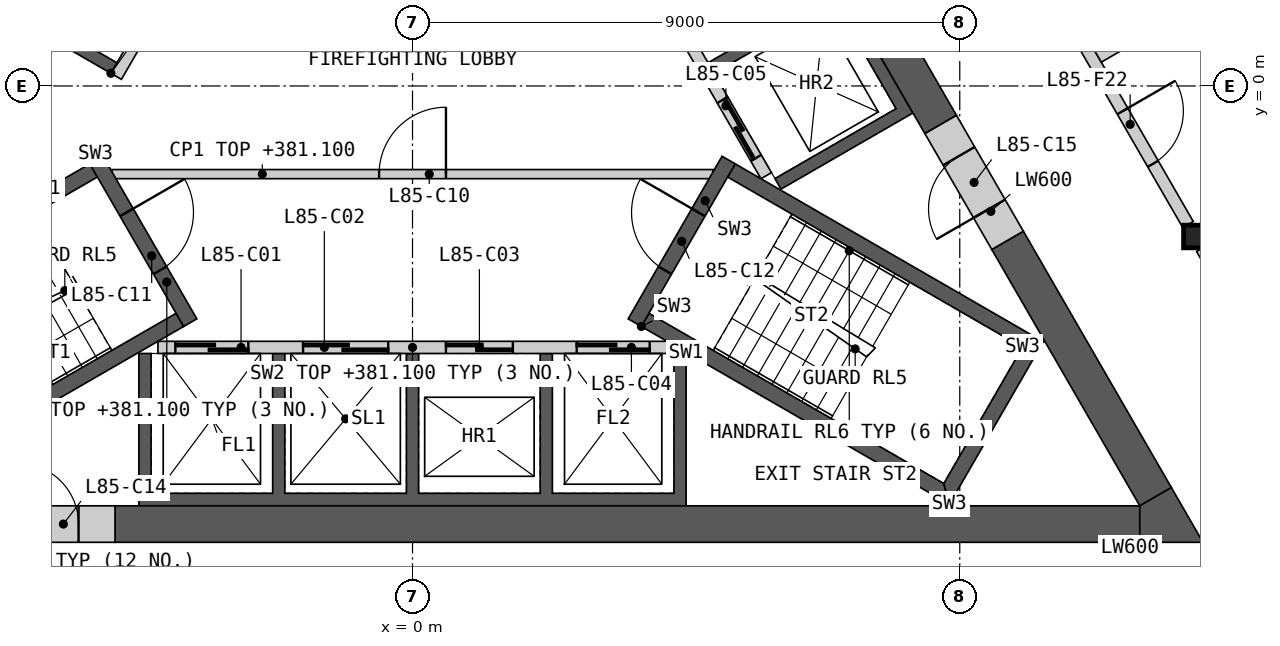
"""IFC4 building model, lengths in metres.
Left out: names, types, materials, properties, quantities, classifications, styles, units other than length and angle.
Written with IfcOpenShell. Run it as: python <this file> out.ifc"""

import sys

from ifc_helpers import new_model, si_unit, direction, frame, frame_2d, origin, origin_2d, place, context, subcontext, project, spatial, polyline, rectangle, i_section, outline, extrude, element, fill, save


model = new_model("IFC4")
c1 = context("Model", 3, precision=1e-05, world=origin(), true_north=direction((0.0, 1.0)))
c2 = subcontext(c1, "Body", "Model", "MODEL_VIEW")
j1 = project(units=[si_unit("LENGTHUNIT", "METRE"), si_unit("PLANEANGLEUNIT", "RADIAN")], contexts=[c1])
p1 = place(None, origin())
s1 = spatial("IfcSite", under=j1, at=p1, CompositionType="ELEMENT")
p2 = place(p1, origin())
s2 = spatial("IfcBuilding", under=s1, at=p2, CompositionType="ELEMENT")
p3 = place(p2, frame((0.0, 0.0, 378.0)))
s3 = spatial("IfcBuildingStorey", under=s2, at=p3, CompositionType="ELEMENT", Elevation=378.0)
p4 = place(p3, frame((12.868, -2.476, 0.0), z_axis=(0.0, 0.0, 1.0), x_axis=(1.0, 0.0, 0.0)))
e1 = element("IfcColumn", 1, at=p4, inside=s3, PredefinedType="COLUMN", context=c2, shape_type="SweptSolid", body=[
    extrude(i_section(OverallWidth=0.374, OverallDepth=0.372, WebThickness=0.016, FlangeThickness=0.026, at=origin_2d()), origin(), (0.0, 0.0, 1.0), 3.4),
])
p5 = place(p3, origin())
e2 = element("IfcWall", 2, at=p5, inside=s3, PredefinedType="SHEAR", context=c2, shape_type="SweptSolid", body=[
    extrude(outline(polyline([(4.5, -4.4), (4.5, -6.906), (-4.5, -6.906), (-4.5, -4.4), (-4.3, -4.4), (-4.3, -6.7), (-2.3, -6.7), (-2.3, -4.4), (-2.1, -4.4), (-2.1, -6.7), (-0.1, -6.7), (-0.1, -4.4), (0.1, -4.4), (0.1, -6.7), (2.1, -6.7), (2.1, -4.4), (2.3, -4.4), (2.3, -6.7), (4.3, -6.7), (4.3, -4.4), (4.5, -4.4)])), origin(), (0.0, 0.0, 1.0), 3.1),
])
p6 = place(p3, frame((-4.187, -4.3, 0.0), z_axis=(0.0, 0.0, 1.0), x_axis=(1.0, 0.0, 0.0)))
e3 = element("IfcWall", 3, at=p6, inside=s3, PredefinedType="SOLIDWALL", context=c2, shape_type="SweptSolid", body=[
    extrude(rectangle(XDim=8.373, YDim=0.2, at=frame_2d((4.187, 0.0))), origin(), (0.0, 0.0, 1.0), 3.1),
])
p7 = place(p6, frame((0.287, 0.0, 0.0)))
e4 = element("IfcOpeningElement", 4, at=p7, cuts=e3, PredefinedType="OPENING", context=c2, shape_type="SweptSolid", body=[
    extrude(rectangle(XDim=1.2, YDim=2.1, at=frame_2d((0.6, 1.05))), frame((0.0, 0.11, 0.0), z_axis=(0.0, -1.0, 0.0), x_axis=(1.0, 0.0, 0.0)), (0.0, 0.0, 1.0), 0.22),
])
p8 = place(p6, frame((2.387, 0.0, 0.0)))
e5 = element("IfcOpeningElement", 5, at=p8, cuts=e3, PredefinedType="OPENING", context=c2, shape_type="SweptSolid", body=[
    extrude(rectangle(XDim=1.4, YDim=2.1, at=frame_2d((0.7, 1.05))), frame((0.0, 0.11, 0.0), z_axis=(0.0, -1.0, 0.0), x_axis=(1.0, 0.0, 0.0)), (0.0, 0.0, 1.0), 0.22),
])
p9 = place(p6, frame((4.737, 0.0, 0.0)))
e6 = element("IfcOpeningElement", 6, at=p9, cuts=e3, PredefinedType="OPENING", context=c2, shape_type="SweptSolid", body=[
    extrude(rectangle(XDim=1.1, YDim=2.1, at=frame_2d((0.55, 1.05))), frame((0.0, 0.11, 0.0), z_axis=(0.0, -1.0, 0.0), x_axis=(1.0, 0.0, 0.0)), (0.0, 0.0, 1.0), 0.22),
])
p10 = place(p6, frame((6.887, 0.0, 0.0)))
e7 = element("IfcOpeningElement", 7, at=p10, cuts=e3, PredefinedType="OPENING", context=c2, shape_type="SweptSolid", body=[
    extrude(rectangle(XDim=1.2, YDim=2.1, at=frame_2d((0.6, 1.05))), frame((0.0, 0.11, 0.0), z_axis=(0.0, -1.0, 0.0), x_axis=(1.0, 0.0, 0.0)), (0.0, 0.0, 1.0), 0.22),
])
p11 = place(p3, origin())
e8 = element("IfcWall", 8, at=p11, inside=s3, PredefinedType="SHEAR", context=c2, shape_type="SweptSolid", body=[
    extrude(outline(polyline([(1.561, 6.097), (3.731, 7.35), (8.231, -0.444), (6.061, -1.697), (5.96, -1.524), (7.952, -0.374), (6.952, 1.358), (4.96, 0.208), (4.861, 0.381), (6.852, 1.531), (5.852, 3.263), (3.861, 2.113), (3.76, 2.287), (5.752, 3.437), (4.752, 5.169), (2.76, 4.019), (2.66, 4.192), (4.652, 5.342), (3.652, 7.074), (1.66, 5.924), (1.561, 6.097)])), origin(), (0.0, 0.0, 1.0), 3.1),
])
p12 = place(p3, frame((5.817, -1.476, 0.0), z_axis=(0.0, 0.0, 1.0), x_axis=(-0.500002616675, 0.866023893041, 0.0)))
e9 = element("IfcWall", 9, at=p12, inside=s3, PredefinedType="SOLIDWALL", context=c2, shape_type="SweptSolid", body=[
    extrude(rectangle(XDim=8.373, YDim=0.2, at=frame_2d((4.187, 0.0))), origin(), (0.0, 0.0, 1.0), 3.1),
])
p13 = place(p12, frame((0.337, 0.0, 0.0)))
e10 = element("IfcOpeningElement", 10, at=p13, cuts=e9, PredefinedType="OPENING", context=c2, shape_type="SweptSolid", body=[
    extrude(rectangle(XDim=1.1, YDim=2.1, at=frame_2d((0.55, 1.05))), frame((0.0, 0.11, 0.0), z_axis=(0.0, -1.0, 0.0), x_axis=(1.0, 0.0, 0.0)), (0.0, 0.0, 1.0), 0.22),
])
p14 = place(p12, frame((2.537, 0.0, 0.0)))
e11 = element("IfcOpeningElement", 11, at=p14, cuts=e9, PredefinedType="OPENING", context=c2, shape_type="SweptSolid", body=[
    extrude(rectangle(XDim=1.1, YDim=2.1, at=frame_2d((0.55, 1.05))), frame((0.0, 0.11, 0.0), z_axis=(0.0, -1.0, 0.0), x_axis=(1.0, 0.0, 0.0)), (0.0, 0.0, 1.0), 0.22),
])
p15 = place(p12, frame((4.737, 0.0, 0.0)))
e12 = element("IfcOpeningElement", 12, at=p15, cuts=e9, PredefinedType="OPENING", context=c2, shape_type="SweptSolid", body=[
    extrude(rectangle(XDim=1.1, YDim=2.1, at=frame_2d((0.55, 1.05))), frame((0.0, 0.11, 0.0), z_axis=(0.0, -1.0, 0.0), x_axis=(1.0, 0.0, 0.0)), (0.0, 0.0, 1.0), 0.22),
])
p16 = place(p12, frame((7.037, 0.0, 0.0)))
e13 = element("IfcOpeningElement", 13, at=p16, cuts=e9, PredefinedType="OPENING", context=c2, shape_type="SweptSolid", body=[
    extrude(rectangle(XDim=0.9, YDim=2.1, at=frame_2d((0.45, 1.05))), frame((0.0, 0.11, 0.0), z_axis=(0.0, -1.0, 0.0), x_axis=(1.0, 0.0, 0.0)), (0.0, 0.0, 1.0), 0.22),
])
p17 = place(p3, origin())
e14 = element("IfcWall", 14, at=p17, inside=s3, PredefinedType="SHEAR", context=c2, shape_type="SweptSolid", body=[
    extrude(outline(polyline([(-4.96, 0.208), (-7.131, 1.461), (-3.731, 7.35), (-1.561, 6.097), (-1.66, 5.924), (-3.652, 7.074), (-6.852, 1.531), (-4.861, 0.381), (-4.96, 0.208)])), origin(), (0.0, 0.0, 1.0), 3.1),
])
p18 = place(p3, frame((-1.631, 5.776, 0.0), z_axis=(0.0, 0.0, 1.0), x_axis=(-0.499992876559, -0.866029516466, 0.0)))
e15 = element("IfcWall", 15, at=p18, inside=s3, PredefinedType="SOLIDWALL", context=c2, shape_type="SweptSolid", body=[
    extrude(rectangle(XDim=6.486, YDim=0.2, at=frame_2d((3.243, 0.0))), origin(), (0.0, 0.0, 1.0), 3.1),
])
p19 = place(p18, frame((2.637, 0.0, 0.0)))
e16 = element("IfcOpeningElement", 16, at=p19, cuts=e15, PredefinedType="OPENING", context=c2, shape_type="SweptSolid", body=[
    extrude(rectangle(XDim=0.9, YDim=2.1, at=frame_2d((0.45, 1.05))), frame((0.0, 0.11, 0.0), z_axis=(0.0, -1.0, 0.0), x_axis=(1.0, 0.0, 0.0)), (0.0, 0.0, 1.0), 0.22),
])
p20 = place(p3, frame((-4.941, -1.45, 0.0), z_axis=(0.0, 0.0, 1.0), x_axis=(1.0, 0.0, 0.0)))
e17 = element("IfcWall", 17, at=p20, inside=s3, PredefinedType="PARTITIONING", context=c2, shape_type="SweptSolid", body=[
    extrude(rectangle(XDim=9.882, YDim=0.15, at=frame_2d((4.941, 0.0))), origin(), (0.0, 0.0, 1.0), 3.1),
])
p21 = place(p20, frame((4.391, 0.0, 0.0)))
e18 = element("IfcOpeningElement", 18, at=p21, cuts=e17, PredefinedType="OPENING", context=c2, shape_type="SweptSolid", body=[
    extrude(rectangle(XDim=1.1, YDim=2.1, at=frame_2d((0.55, 1.05))), frame((0.0, 0.085, 0.0), z_axis=(0.0, -1.0, 0.0), x_axis=(1.0, 0.0, 0.0)), (0.0, 0.0, 1.0), 0.17),
])
p22 = place(p3, origin())
e19 = element("IfcWall", 19, at=p22, inside=s3, PredefinedType="SHEAR", context=c2, shape_type="SweptSolid", body=[
    extrude(outline(polyline([(-5.307, -1.281), (-10.374, -4.206), (-10.032, -4.298), (-5.182, -1.498), (-5.307, -1.281)])), origin(), (0.0, 0.0, 1.0), 3.1),
])
p23 = place(p3, origin())
e20 = element("IfcWall", 20, at=p23, inside=s3, PredefinedType="SHEAR", context=c2, shape_type="SweptSolid", body=[
    extrude(outline(polyline([(-8.738, -6.539), (-8.83, -6.881), (-3.763, -3.956), (-3.888, -3.739), (-8.738, -6.539)])), origin(), (0.0, 0.0, 1.0), 3.1),
])
p24 = place(p3, frame((-5.199, -1.219, 0.0), z_axis=(0.0, 0.0, 1.0), x_axis=(0.499982516597, -0.866035497597, 0.0)))
e21 = element("IfcWall", 21, at=p24, inside=s3, PredefinedType="SHEAR", context=c2, shape_type="SweptSolid", body=[
    extrude(rectangle(XDim=3.088, YDim=0.25, at=frame_2d((1.544, 0.0))), origin(), (0.0, 0.0, 1.0), 3.1),
])
p25 = place(p24, frame((0.994, 0.0, 0.0)))
e22 = element("IfcOpeningElement", 22, at=p25, cuts=e21, PredefinedType="OPENING", context=c2, shape_type="SweptSolid", body=[
    extrude(rectangle(XDim=1.1, YDim=2.1, at=frame_2d((0.55, 1.05))), frame((0.0, 0.135, 0.0), z_axis=(0.0, -1.0, 0.0), x_axis=(1.0, 0.0, 0.0)), (0.0, 0.0, 1.0), 0.27),
])
p26 = place(p3, origin())
e23 = element("IfcWall", 23, at=p26, inside=s3, PredefinedType="SHEAR", context=c2, shape_type="SweptSolid", body=[
    extrude(outline(polyline([(3.763, -3.956), (8.83, -6.881), (8.738, -6.539), (3.888, -3.739), (3.763, -3.956)])), origin(), (0.0, 0.0, 1.0), 3.1),
])
p27 = place(p3, origin())
e24 = element("IfcWall", 24, at=p27, inside=s3, PredefinedType="SHEAR", context=c2, shape_type="SweptSolid", body=[
    extrude(outline(polyline([(8.83, -6.881), (10.374, -4.206), (10.032, -4.298), (8.738, -6.539), (8.83, -6.881)])), origin(), (0.0, 0.0, 1.0), 3.1),
])
p28 = place(p3, origin())
e25 = element("IfcWall", 25, at=p28, inside=s3, PredefinedType="SHEAR", context=c2, shape_type="SweptSolid", body=[
    extrude(outline(polyline([(10.032, -4.298), (10.374, -4.206), (5.307, -1.281), (5.182, -1.498), (10.032, -4.298)])), origin(), (0.0, 0.0, 1.0), 3.1),
])
p29 = place(p3, frame((3.655, -3.893, 0.0), z_axis=(0.0, 0.0, 1.0), x_axis=(0.499982516597, 0.866035497597, 0.0)))
e26 = element("IfcWall", 26, at=p29, inside=s3, PredefinedType="SHEAR", context=c2, shape_type="SweptSolid", body=[
    extrude(rectangle(XDim=3.088, YDim=0.25, at=frame_2d((1.544, 0.0))), origin(), (0.0, 0.0, 1.0), 3.1),
])
p30 = place(p29, frame((0.994, 0.0, 0.0)))
e27 = element("IfcOpeningElement", 27, at=p30, cuts=e26, PredefinedType="OPENING", context=c2, shape_type="SweptSolid", body=[
    extrude(rectangle(XDim=1.1, YDim=2.1, at=frame_2d((0.55, 1.05))), frame((0.0, 0.135, 0.0), z_axis=(0.0, -1.0, 0.0), x_axis=(1.0, 0.0, 0.0)), (0.0, 0.0, 1.0), 0.27),
])
for number, where, z_axis, x_axis in (
    (28, (-4.892, -7.206, 0.0), (0.0, 0.0, 1.0), (1.0, 0.0, 0.0)),
    (29, (8.686, -0.634, 0.0), (0.0, 0.0, 1.0), (-0.5, 0.866, 0.0)),
):
    element("IfcWall", number, at=place(p3, frame(where, z_axis=z_axis, x_axis=x_axis)), inside=s3, PredefinedType="SHEAR", context=c2, shape_type="SweptSolid", body=[
        extrude(rectangle(XDim=16.853, YDim=0.6, at=frame_2d((8.426, 0.0))), origin(), (0.0, 0.0, 1.0), 3.1),
    ])
p31 = place(p3, frame((12.221, -6.756, 0.0), z_axis=(0.0, 0.0, 1.0), x_axis=(-0.50000604952, 0.866021911064, 0.0)))
e30 = element("IfcWall", 30, at=p31, inside=s3, PredefinedType="SHEAR", context=c2, shape_type="SweptSolid", body=[
    extrude(rectangle(XDim=4.869, YDim=0.6, at=frame_2d((2.434, 0.0))), origin(), (0.0, 0.0, 1.0), 3.1),
])
p32 = place(p3, origin())
e31 = element("IfcWall", 31, at=p32, inside=s3, PredefinedType="SHEAR", context=c2, shape_type="SweptSolid", body=[
    extrude(outline(polyline([(11.961, -7.506), (11.961, -6.906), (12.48, -6.606), (13.0, -7.506), (11.961, -7.506)])), origin(), (0.0, 0.0, 1.0), 3.1),
])
p33 = place(p3, frame((-7.092, -7.206, 0.0), z_axis=(0.0, 0.0, 1.0), x_axis=(1.0, 0.0, 0.0)))
e32 = element("IfcWall", 32, at=p33, inside=s3, PredefinedType="SHEAR", context=c2, shape_type="SweptSolid", body=[
    extrude(rectangle(XDim=2.2, YDim=0.6, at=frame_2d((1.1, 0.0))), origin(), (0.0, 0.0, 1.0), 3.1),
])
p34 = place(p33, frame((0.6, 0.0, 0.0)))
e33 = element("IfcOpeningElement", 33, at=p34, cuts=e32, PredefinedType="OPENING", context=c2, shape_type="SweptSolid", body=[
    extrude(rectangle(XDim=1.0, YDim=2.1, at=frame_2d((0.5, 1.05))), frame((0.0, 0.31, 0.0), z_axis=(0.0, -1.0, 0.0), x_axis=(1.0, 0.0, 0.0)), (0.0, 0.0, 1.0), 0.62),
])
p35 = place(p3, frame((9.786, -2.539, 0.0), z_axis=(0.0, 0.0, 1.0), x_axis=(-0.499981787252, 0.866035918664, 0.0)))
e34 = element("IfcWall", 34, at=p35, inside=s3, PredefinedType="SHEAR", context=c2, shape_type="SweptSolid", body=[
    extrude(rectangle(XDim=2.2, YDim=0.6, at=frame_2d((1.1, 0.0))), origin(), (0.0, 0.0, 1.0), 3.1),
])
p36 = place(p35, frame((0.6, 0.0, 0.0)))
e35 = element("IfcOpeningElement", 35, at=p36, cuts=e34, PredefinedType="OPENING", context=c2, shape_type="SweptSolid", body=[
    extrude(rectangle(XDim=1.0, YDim=2.1, at=frame_2d((0.5, 1.05))), frame((0.0, 0.31, 0.0), z_axis=(0.0, -1.0, 0.0), x_axis=(1.0, 0.0, 0.0)), (0.0, 0.0, 1.0), 0.62),
])
p37 = place(p3, frame((8.692, 4.756, 0.0), z_axis=(0.0, 0.0, 1.0), x_axis=(0.500001682468, -0.866024432409, 0.0)))
e36 = element("IfcWall", 36, at=p37, inside=s3, PredefinedType="PARTITIONING", context=c2, shape_type="SweptSolid", body=[
    extrude(rectangle(XDim=8.124, YDim=0.2, at=frame_2d((4.062, 0.0))), origin(), (0.0, 0.0, 1.0), 3.1),
])
p38 = place(p37, frame((5.97, 0.0, 0.0)))
e37 = element("IfcOpeningElement", 37, at=p38, cuts=e36, PredefinedType="OPENING", context=c2, shape_type="SweptSolid", body=[
    extrude(rectangle(XDim=1.0, YDim=2.1, at=frame_2d((0.5, 1.05))), frame((0.0, 0.11, 0.0), z_axis=(0.0, -1.0, 0.0), x_axis=(1.0, 0.0, 0.0)), (0.0, 0.0, 1.0), 0.22),
])
p39 = place(p3, frame((12.981, -2.673, 0.0), z_axis=(0.0, 0.0, 1.0), x_axis=(0.499986217557, -0.866033360935, 0.0)))
e38 = element("IfcWall", 38, at=p39, inside=s3, PredefinedType="PARTITIONING", context=c2, shape_type="SweptSolid", body=[
    extrude(rectangle(XDim=4.3, YDim=0.2, at=frame_2d((2.15, 0.0))), origin(), (0.0, 0.0, 1.0), 3.1),
])
p40 = place(p3, frame((11.265, 0.5, 0.0), z_axis=(0.0, 0.0, 1.0), x_axis=(0.866051307416, 0.49995513091, 0.0)))
e39 = element("IfcWall", 39, at=p40, inside=s3, PredefinedType="PARTITIONING", context=c2, shape_type="SweptSolid", body=[
    extrude(rectangle(XDim=2.725, YDim=0.25, at=frame_2d((1.362, 0.0))), origin(), (0.0, 0.0, 1.0), 2.33),
])
p41 = place(p7, origin())
e40 = element("IfcDoor", 40, at=p41, inside=s3, OperationType="SLIDING_TO_LEFT", PredefinedType="DOOR", context=c2, shape_type="SweptSolid", body=[
    extrude(rectangle(XDim=1.2, YDim=2.1, at=frame_2d((0.6, 1.05))), frame((0.0, 0.025, 0.0), z_axis=(0.0, -1.0, 0.0), x_axis=(1.0, 0.0, 0.0)), (0.0, 0.0, 1.0), 0.05),
])
fill(e4, e40)
p42 = place(p8, origin())
e41 = element("IfcDoor", 41, at=p42, inside=s3, OperationType="SLIDING_TO_LEFT", PredefinedType="DOOR", context=c2, shape_type="SweptSolid", body=[
    extrude(rectangle(XDim=1.4, YDim=2.1, at=frame_2d((0.7, 1.05))), frame((0.0, 0.025, 0.0), z_axis=(0.0, -1.0, 0.0), x_axis=(1.0, 0.0, 0.0)), (0.0, 0.0, 1.0), 0.05),
])
fill(e5, e41)
p43 = place(p9, origin())
e42 = element("IfcDoor", 42, at=p43, inside=s3, OperationType="SLIDING_TO_LEFT", PredefinedType="DOOR", context=c2, shape_type="SweptSolid", body=[
    extrude(rectangle(XDim=1.1, YDim=2.1, at=frame_2d((0.55, 1.05))), frame((0.0, 0.025, 0.0), z_axis=(0.0, -1.0, 0.0), x_axis=(1.0, 0.0, 0.0)), (0.0, 0.0, 1.0), 0.05),
])
fill(e6, e42)
p44 = place(p10, origin())
e43 = element("IfcDoor", 43, at=p44, inside=s3, OperationType="SLIDING_TO_LEFT", PredefinedType="DOOR", context=c2, shape_type="SweptSolid", body=[
    extrude(rectangle(XDim=1.2, YDim=2.1, at=frame_2d((0.6, 1.05))), frame((0.0, 0.025, 0.0), z_axis=(0.0, -1.0, 0.0), x_axis=(1.0, 0.0, 0.0)), (0.0, 0.0, 1.0), 0.05),
])
fill(e7, e43)
p45 = place(p13, origin())
e44 = element("IfcDoor", 44, at=p45, inside=s3, OperationType="SLIDING_TO_LEFT", PredefinedType="DOOR", context=c2, shape_type="SweptSolid", body=[
    extrude(rectangle(XDim=1.1, YDim=2.1, at=frame_2d((0.55, 1.05))), frame((0.0, 0.025, 0.0), z_axis=(0.0, -1.0, 0.0), x_axis=(1.0, 0.0, 0.0)), (0.0, 0.0, 1.0), 0.05),
])
fill(e10, e44)
p46 = place(p21, origin())
e45 = element("IfcDoor", 45, at=p46, inside=s3, OperationType="SINGLE_SWING_RIGHT", PredefinedType="DOOR", context=c2, shape_type="SweptSolid", body=[
    extrude(rectangle(XDim=1.1, YDim=2.1, at=frame_2d((0.55, 1.05))), frame((0.0, 0.025, 0.0), z_axis=(0.0, -1.0, 0.0), x_axis=(1.0, 0.0, 0.0)), (0.0, 0.0, 1.0), 0.05),
])
fill(e18, e45)
p47 = place(p25, origin())
e46 = element("IfcDoor", 46, at=p47, inside=s3, OperationType="SINGLE_SWING_LEFT", PredefinedType="DOOR", context=c2, shape_type="SweptSolid", body=[
    extrude(rectangle(XDim=1.1, YDim=2.1, at=frame_2d((0.55, 1.05))), frame((0.0, 0.025, 0.0), z_axis=(0.0, -1.0, 0.0), x_axis=(1.0, 0.0, 0.0)), (0.0, 0.0, 1.0), 0.05),
])
fill(e22, e46)
p48 = place(p30, origin())
e47 = element("IfcDoor", 47, at=p48, inside=s3, OperationType="SINGLE_SWING_RIGHT", PredefinedType="DOOR", context=c2, shape_type="SweptSolid", body=[
    extrude(rectangle(XDim=1.1, YDim=2.1, at=frame_2d((0.55, 1.05))), frame((0.0, 0.025, 0.0), z_axis=(0.0, -1.0, 0.0), x_axis=(1.0, 0.0, 0.0)), (0.0, 0.0, 1.0), 0.05),
])
fill(e27, e47)
p49 = place(p34, origin())
e48 = element("IfcDoor", 48, at=p49, inside=s3, OperationType="SINGLE_SWING_LEFT", PredefinedType="DOOR", context=c2, shape_type="SweptSolid", body=[
    extrude(rectangle(XDim=1.0, YDim=2.1, at=frame_2d((0.5, 1.05))), frame((0.0, 0.055, 0.0), z_axis=(0.0, -1.0, 0.0), x_axis=(1.0, 0.0, 0.0)), (0.0, 0.0, 1.0), 0.05),
])
fill(e33, e48)
p50 = place(p36, origin())
e49 = element("IfcDoor", 49, at=p50, inside=s3, OperationType="SINGLE_SWING_LEFT", PredefinedType="DOOR", context=c2, shape_type="SweptSolid", body=[
    extrude(rectangle(XDim=1.0, YDim=2.1, at=frame_2d((0.5, 1.05))), frame((0.0, 0.055, 0.0), z_axis=(0.0, -1.0, 0.0), x_axis=(1.0, 0.0, 0.0)), (0.0, 0.0, 1.0), 0.05),
])
fill(e35, e49)
p51 = place(p38, origin())
e50 = element("IfcDoor", 50, at=p51, inside=s3, OperationType="SINGLE_SWING_LEFT", PredefinedType="DOOR", context=c2, shape_type="SweptSolid", body=[
    extrude(rectangle(XDim=1.0, YDim=2.1, at=frame_2d((0.5, 1.05))), frame((0.0, 0.025, 0.0), z_axis=(0.0, -1.0, 0.0), x_axis=(1.0, 0.0, 0.0)), (0.0, 0.0, 1.0), 0.05),
])
fill(e37, e50)
save(model, sys.argv[1])
